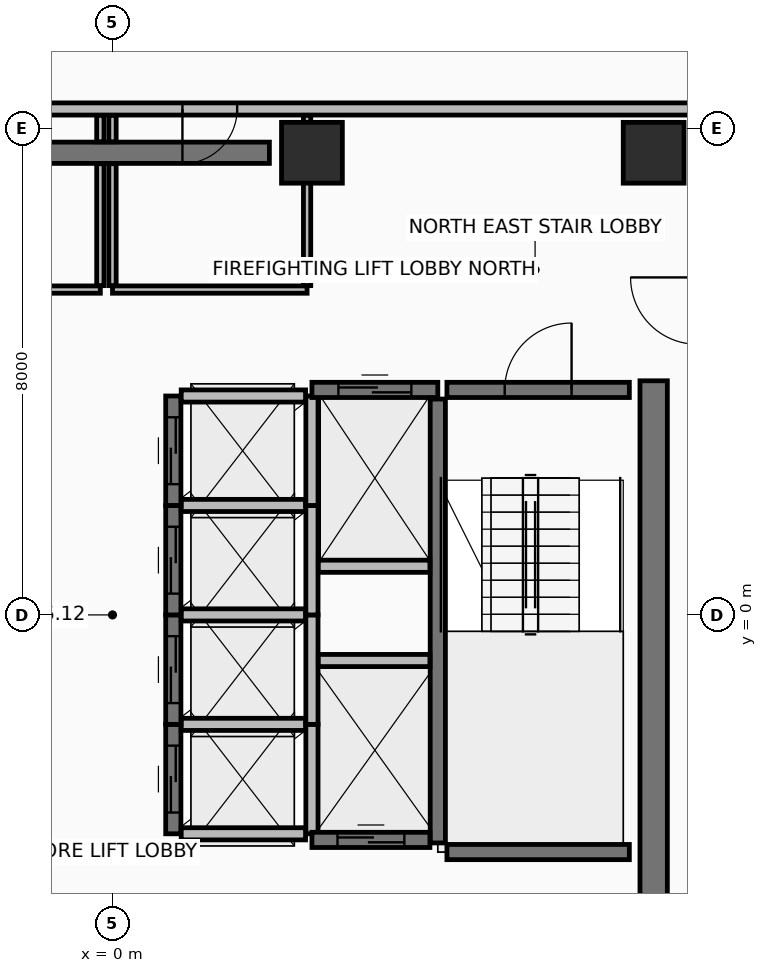
"""IFC4 building model, lengths in metres.
Left out: names, types, materials, properties, quantities, classifications, styles, units other than length and angle.
Written with IfcOpenShell. Run it as: python <this file> out.ifc"""

import sys

from ifc_helpers import new_model, si_unit, direction, frame, frame_2d, origin, origin_2d, place, context, subcontext, project, spatial, rectangle, extrude, element, fill, save


model = new_model("IFC4")
c1 = context("Model", 3, precision=1e-05, world=origin(), true_north=direction((0.0, 1.0)))
c2 = subcontext(c1, "Body", "Model", "MODEL_VIEW")
j1 = project(units=[si_unit("LENGTHUNIT", "METRE"), si_unit("PLANEANGLEUNIT", "RADIAN")], contexts=[c1])
p1 = place(None, origin())
s1 = spatial("IfcSite", under=j1, at=p1, CompositionType="ELEMENT")
p2 = place(p1, origin())
s2 = spatial("IfcBuilding", under=s1, at=p2, CompositionType="ELEMENT")
p3 = place(p2, frame((0.0, 0.0, 234.25)))
s3 = spatial("IfcBuildingStorey", under=s2, at=p3, CompositionType="ELEMENT", Elevation=234.25)
for number, where, z_axis, x_axis in (
    (1, (8.9, 7.6, 0.0), (0.0, 0.0, 1.0), (1.0, 0.0, 0.0)),
    (2, (3.28, 7.6, 0.0), (0.0, 0.0, 1.0), (1.0, 0.0, 0.0)),
):
    element("IfcColumn", number, at=place(p3, frame(where, z_axis=z_axis, x_axis=x_axis)), inside=s3, PredefinedType="COLUMN", context=c2, shape_type="SweptSolid", body=[
        extrude(rectangle(XDim=1.0, YDim=1.0, at=origin_2d()), origin(), (0.0, 0.0, 1.0), 3.6),
    ])
p4 = place(p3, frame((-2.8, 7.6, 0.0), z_axis=(0.0, 0.0, 1.0), x_axis=(1.0, 0.0, 0.0)))
e3 = element("IfcWall", 3, at=p4, inside=s3, PredefinedType="SHEAR", context=c2, shape_type="SweptSolid", body=[
    extrude(rectangle(XDim=5.38, YDim=0.35, at=frame_2d((2.69, 0.0))), origin(), (0.0, 0.0, 1.0), 3.42),
])
p5 = place(p3, frame((8.9, -6.85, 0.0), z_axis=(0.0, 0.0, 1.0), x_axis=(0.0, 1.0, 0.0)))
e4 = element("IfcWall", 4, at=p5, inside=s3, PredefinedType="SHEAR", context=c2, shape_type="SweptSolid", body=[
    extrude(rectangle(XDim=10.7, YDim=0.45, at=frame_2d((5.35, 0.0))), origin(), (0.0, 0.0, 1.0), 3.42),
])
p6 = place(p3, frame((9.62, 8.32, 0.0), z_axis=(0.0, 0.0, 1.0), x_axis=(-1.0, 0.0, 0.0)))
e5 = element("IfcWall", 5, at=p6, inside=s3, PredefinedType="PARTITIONING", context=c2, shape_type="SweptSolid", body=[
    extrude(rectangle(XDim=19.24, YDim=0.2, at=frame_2d((9.62, 0.0))), origin(), (0.0, 0.0, 1.0), 2.915),
])
p7 = place(p6, frame((10.97, 0.0, 0.0)))
e6 = element("IfcOpeningElement", 6, at=p7, cuts=e5, PredefinedType="OPENING", context=c2, shape_type="SweptSolid", body=[
    extrude(rectangle(XDim=0.9, YDim=2.1, at=frame_2d((0.45, 1.05))), frame((0.0, 0.11, 0.0), z_axis=(0.0, -1.0, 0.0), x_axis=(1.0, 0.0, 0.0)), (0.0, 0.0, 1.0), 0.22),
])
p8 = place(p6, frame((7.57, 0.0, 0.0)))
e7 = element("IfcOpeningElement", 7, at=p8, cuts=e5, PredefinedType="OPENING", context=c2, shape_type="SweptSolid", body=[
    extrude(rectangle(XDim=0.9, YDim=2.1, at=frame_2d((0.45, 1.05))), frame((0.0, 0.11, 0.0), z_axis=(0.0, -1.0, 0.0), x_axis=(1.0, 0.0, 0.0)), (0.0, 0.0, 1.0), 0.22),
])
p9 = place(p6, frame((16.245, 0.0, 0.0)))
e8 = element("IfcOpeningElement", 8, at=p9, cuts=e5, PredefinedType="OPENING", context=c2, shape_type="SweptSolid", body=[
    extrude(rectangle(XDim=0.9, YDim=2.1, at=frame_2d((0.45, 1.05))), frame((0.0, 0.11, 0.0), z_axis=(0.0, -1.0, 0.0), x_axis=(1.0, 0.0, 0.0)), (0.0, 0.0, 1.0), 0.22),
])
p10 = place(p6, frame((14.295, 0.0, 0.0)))
e9 = element("IfcOpeningElement", 9, at=p10, cuts=e5, PredefinedType="OPENING", context=c2, shape_type="SweptSolid", body=[
    extrude(rectangle(XDim=0.9, YDim=2.1, at=frame_2d((0.45, 1.05))), frame((0.0, 0.11, 0.0), z_axis=(0.0, -1.0, 0.0), x_axis=(1.0, 0.0, 0.0)), (0.0, 0.0, 1.0), 0.22),
])
p11 = place(p3, frame((5.35, -3.75, 0.0), z_axis=(0.0, 0.0, 1.0), x_axis=(0.0, 1.0, 0.0)))
e10 = element("IfcWall", 10, at=p11, inside=s3, PredefinedType="SHEAR", context=c2, shape_type="SweptSolid", body=[
    extrude(rectangle(XDim=7.3, YDim=0.25, at=frame_2d((3.65, 0.0))), origin(), (0.0, 0.0, 1.0), 3.42),
])
p12 = place(p3, frame((5.5, 3.7, 0.0), z_axis=(0.0, 0.0, 1.0), x_axis=(1.0, 0.0, 0.0)))
e11 = element("IfcWall", 11, at=p12, inside=s3, PredefinedType="SHEAR", context=c2, shape_type="SweptSolid", body=[
    extrude(rectangle(XDim=3.0, YDim=0.25, at=frame_2d((1.5, 0.0))), origin(), (0.0, 0.0, 1.0), 3.42),
])
p13 = place(p12, frame((0.95, 0.0, 0.0)))
e12 = element("IfcOpeningElement", 12, at=p13, cuts=e11, PredefinedType="OPENING", context=c2, shape_type="SweptSolid", body=[
    extrude(rectangle(XDim=1.1, YDim=2.15, at=frame_2d((0.55, 1.075))), frame((0.0, 0.135, 0.0), z_axis=(0.0, -1.0, 0.0), x_axis=(1.0, 0.0, 0.0)), (0.0, 0.0, 1.0), 0.27),
])
p14 = place(p3, frame((5.5, -3.9, 0.0), z_axis=(0.0, 0.0, 1.0), x_axis=(1.0, 0.0, 0.0)))
e13 = element("IfcWall", 13, at=p14, inside=s3, PredefinedType="SHEAR", context=c2, shape_type="SweptSolid", body=[
    extrude(rectangle(XDim=3.0, YDim=0.25, at=frame_2d((1.5, 0.0))), origin(), (0.0, 0.0, 1.0), 3.42),
])
p15 = place(p3, frame((1.0, -3.6, 0.0), z_axis=(0.0, 0.0, 1.0), x_axis=(0.0, 1.0, 0.0)))
e14 = element("IfcWall", 14, at=p15, inside=s3, PredefinedType="SHEAR", context=c2, shape_type="SweptSolid", body=[
    extrude(rectangle(XDim=1.8, YDim=0.25, at=frame_2d((0.9, 0.0))), origin(), (0.0, 0.0, 1.0), 3.42),
])
p16 = place(p15, frame((0.35, 0.0, 0.0)))
e15 = element("IfcOpeningElement", 15, at=p16, cuts=e14, PredefinedType="OPENING", context=c2, shape_type="SweptSolid", body=[
    extrude(rectangle(XDim=1.1, YDim=2.2, at=frame_2d((0.55, 1.1))), frame((0.0, 0.135, 0.0), z_axis=(0.0, -1.0, 0.0), x_axis=(1.0, 0.0, 0.0)), (0.0, 0.0, 1.0), 0.27),
])
p17 = place(p3, frame((3.28, -3.6, 0.0), z_axis=(0.0, 0.0, 1.0), x_axis=(0.0, 1.0, 0.0)))
e16 = element("IfcWall", 16, at=p17, inside=s3, PredefinedType="PARTITIONING", context=c2, shape_type="SweptSolid", body=[
    extrude(rectangle(XDim=1.8, YDim=0.2, at=frame_2d((0.9, 0.0))), origin(), (0.0, 0.0, 1.0), 3.42),
])
for number, where, z_axis, x_axis in (
    (17, (1.13, -3.6, 0.0), (0.0, 0.0, 1.0), (1.0, 0.0, 0.0)),
    (18, (1.13, -1.8, 0.0), (0.0, 0.0, 1.0), (1.0, 0.0, 0.0)),
):
    element("IfcWall", number, at=place(p3, frame(where, z_axis=z_axis, x_axis=x_axis)), inside=s3, PredefinedType="PARTITIONING", context=c2, shape_type="SweptSolid", body=[
        extrude(rectangle(XDim=2.045, YDim=0.2, at=frame_2d((1.022, 0.0))), origin(), (0.0, 0.0, 1.0), 3.42),
    ])
p18 = place(p3, frame((1.0, -1.8, 0.0), z_axis=(0.0, 0.0, 1.0), x_axis=(0.0, 1.0, 0.0)))
e19 = element("IfcWall", 19, at=p18, inside=s3, PredefinedType="SHEAR", context=c2, shape_type="SweptSolid", body=[
    extrude(rectangle(XDim=1.8, YDim=0.25, at=frame_2d((0.9, 0.0))), origin(), (0.0, 0.0, 1.0), 3.42),
])
p19 = place(p18, frame((0.35, 0.0, 0.0)))
e20 = element("IfcOpeningElement", 20, at=p19, cuts=e19, PredefinedType="OPENING", context=c2, shape_type="SweptSolid", body=[
    extrude(rectangle(XDim=1.1, YDim=2.2, at=frame_2d((0.55, 1.1))), frame((0.0, 0.135, 0.0), z_axis=(0.0, -1.0, 0.0), x_axis=(1.0, 0.0, 0.0)), (0.0, 0.0, 1.0), 0.27),
])
p20 = place(p3, frame((3.28, -1.8, 0.0), z_axis=(0.0, 0.0, 1.0), x_axis=(0.0, 1.0, 0.0)))
e21 = element("IfcWall", 21, at=p20, inside=s3, PredefinedType="PARTITIONING", context=c2, shape_type="SweptSolid", body=[
    extrude(rectangle(XDim=1.8, YDim=0.2, at=frame_2d((0.9, 0.0))), origin(), (0.0, 0.0, 1.0), 3.42),
])
p21 = place(p3, frame((1.13, 0.0, 0.0), z_axis=(0.0, 0.0, 1.0), x_axis=(1.0, 0.0, 0.0)))
e22 = element("IfcWall", 22, at=p21, inside=s3, PredefinedType="PARTITIONING", context=c2, shape_type="SweptSolid", body=[
    extrude(rectangle(XDim=2.045, YDim=0.2, at=frame_2d((1.022, 0.0))), origin(), (0.0, 0.0, 1.0), 3.42),
])
p22 = place(p3, frame((1.0, 0.0, 0.0), z_axis=(0.0, 0.0, 1.0), x_axis=(0.0, 1.0, 0.0)))
e23 = element("IfcWall", 23, at=p22, inside=s3, PredefinedType="SHEAR", context=c2, shape_type="SweptSolid", body=[
    extrude(rectangle(XDim=1.8, YDim=0.25, at=frame_2d((0.9, 0.0))), origin(), (0.0, 0.0, 1.0), 3.42),
])
p23 = place(p22, frame((0.35, 0.0, 0.0)))
e24 = element("IfcOpeningElement", 24, at=p23, cuts=e23, PredefinedType="OPENING", context=c2, shape_type="SweptSolid", body=[
    extrude(rectangle(XDim=1.1, YDim=2.2, at=frame_2d((0.55, 1.1))), frame((0.0, 0.135, 0.0), z_axis=(0.0, -1.0, 0.0), x_axis=(1.0, 0.0, 0.0)), (0.0, 0.0, 1.0), 0.27),
])
p24 = place(p3, frame((3.28, 0.0, 0.0), z_axis=(0.0, 0.0, 1.0), x_axis=(0.0, 1.0, 0.0)))
e25 = element("IfcWall", 25, at=p24, inside=s3, PredefinedType="PARTITIONING", context=c2, shape_type="SweptSolid", body=[
    extrude(rectangle(XDim=1.8, YDim=0.2, at=frame_2d((0.9, 0.0))), origin(), (0.0, 0.0, 1.0), 3.42),
])
p25 = place(p3, frame((1.13, 1.8, 0.0), z_axis=(0.0, 0.0, 1.0), x_axis=(1.0, 0.0, 0.0)))
e26 = element("IfcWall", 26, at=p25, inside=s3, PredefinedType="PARTITIONING", context=c2, shape_type="SweptSolid", body=[
    extrude(rectangle(XDim=2.045, YDim=0.2, at=frame_2d((1.022, 0.0))), origin(), (0.0, 0.0, 1.0), 3.42),
])
p26 = place(p3, frame((1.0, 1.8, 0.0), z_axis=(0.0, 0.0, 1.0), x_axis=(0.0, 1.0, 0.0)))
e27 = element("IfcWall", 27, at=p26, inside=s3, PredefinedType="SHEAR", context=c2, shape_type="SweptSolid", body=[
    extrude(rectangle(XDim=1.8, YDim=0.25, at=frame_2d((0.9, 0.0))), origin(), (0.0, 0.0, 1.0), 3.42),
])
p27 = place(p26, frame((0.35, 0.0, 0.0)))
e28 = element("IfcOpeningElement", 28, at=p27, cuts=e27, PredefinedType="OPENING", context=c2, shape_type="SweptSolid", body=[
    extrude(rectangle(XDim=1.1, YDim=2.2, at=frame_2d((0.55, 1.1))), frame((0.0, 0.135, 0.0), z_axis=(0.0, -1.0, 0.0), x_axis=(1.0, 0.0, 0.0)), (0.0, 0.0, 1.0), 0.27),
])
p28 = place(p3, frame((3.28, 1.8, 0.0), z_axis=(0.0, 0.0, 1.0), x_axis=(0.0, 1.0, 0.0)))
e29 = element("IfcWall", 29, at=p28, inside=s3, PredefinedType="PARTITIONING", context=c2, shape_type="SweptSolid", body=[
    extrude(rectangle(XDim=1.8, YDim=0.2, at=frame_2d((0.9, 0.0))), origin(), (0.0, 0.0, 1.0), 3.42),
])
p29 = place(p3, frame((1.13, 3.6, 0.0), z_axis=(0.0, 0.0, 1.0), x_axis=(1.0, 0.0, 0.0)))
e30 = element("IfcWall", 30, at=p29, inside=s3, PredefinedType="PARTITIONING", context=c2, shape_type="SweptSolid", body=[
    extrude(rectangle(XDim=2.045, YDim=0.2, at=frame_2d((1.022, 0.0))), origin(), (0.0, 0.0, 1.0), 2.715),
])
p30 = place(p3, frame((3.28, 3.7, 0.0), z_axis=(0.0, 0.0, 1.0), x_axis=(1.0, 0.0, 0.0)))
e31 = element("IfcWall", 31, at=p30, inside=s3, PredefinedType="SHEAR", context=c2, shape_type="SweptSolid", body=[
    extrude(rectangle(XDim=2.07, YDim=0.25, at=frame_2d((1.035, 0.0))), origin(), (0.0, 0.0, 1.0), 3.42),
])
p31 = place(p30, frame((0.435, 0.0, 0.0)))
e32 = element("IfcOpeningElement", 32, at=p31, cuts=e31, PredefinedType="OPENING", context=c2, shape_type="SweptSolid", body=[
    extrude(rectangle(XDim=1.2, YDim=2.2, at=frame_2d((0.6, 1.1))), frame((0.0, 0.135, 0.0), z_axis=(0.0, -1.0, 0.0), x_axis=(1.0, 0.0, 0.0)), (0.0, 0.0, 1.0), 0.27),
])
p32 = place(p3, frame((3.385, 0.8, 0.0), z_axis=(0.0, 0.0, 1.0), x_axis=(1.0, 0.0, 0.0)))
e33 = element("IfcWall", 33, at=p32, inside=s3, PredefinedType="PARTITIONING", context=c2, shape_type="SweptSolid", body=[
    extrude(rectangle(XDim=1.835, YDim=0.2, at=frame_2d((0.917, 0.0))), origin(), (0.0, 0.0, 1.0), 3.42),
])
p33 = place(p3, frame((3.28, -3.7, 0.0), z_axis=(0.0, 0.0, 1.0), x_axis=(1.0, 0.0, 0.0)))
e34 = element("IfcWall", 34, at=p33, inside=s3, PredefinedType="SHEAR", context=c2, shape_type="SweptSolid", body=[
    extrude(rectangle(XDim=1.94, YDim=0.25, at=frame_2d((0.97, 0.0))), origin(), (0.0, 0.0, 1.0), 3.42),
])
p34 = place(p33, frame((0.42, 0.0, 0.0)))
e35 = element("IfcOpeningElement", 35, at=p34, cuts=e34, PredefinedType="OPENING", context=c2, shape_type="SweptSolid", body=[
    extrude(rectangle(XDim=1.1, YDim=2.2, at=frame_2d((0.55, 1.1))), frame((0.0, 0.135, 0.0), z_axis=(0.0, -1.0, 0.0), x_axis=(1.0, 0.0, 0.0)), (0.0, 0.0, 1.0), 0.27),
])
p35 = place(p3, frame((3.385, -0.75, 0.0), z_axis=(0.0, 0.0, 1.0), x_axis=(1.0, 0.0, 0.0)))
e36 = element("IfcWall", 36, at=p35, inside=s3, PredefinedType="PARTITIONING", context=c2, shape_type="SweptSolid", body=[
    extrude(rectangle(XDim=1.835, YDim=0.2, at=frame_2d((0.917, 0.0))), origin(), (0.0, 0.0, 1.0), 3.42),
])
p36 = place(p3, frame((-3.4, 5.35, 0.0), z_axis=(0.0, 0.0, 1.0), x_axis=(1.0, 0.0, 0.0)))
e37 = element("IfcWall", 37, at=p36, inside=s3, PredefinedType="PARTITIONING", context=c2, shape_type="SweptSolid", body=[
    extrude(rectangle(XDim=3.2, YDim=0.12, at=frame_2d((1.6, 0.0))), origin(), (0.0, 0.0, 1.0), 3.42),
])
p37 = place(p3, frame((-0.2, 5.415, 0.0), z_axis=(0.0, 0.0, 1.0), x_axis=(0.0, 1.0, 0.0)))
e38 = element("IfcWall", 38, at=p37, inside=s3, PredefinedType="PARTITIONING", context=c2, shape_type="SweptSolid", body=[
    extrude(rectangle(XDim=2.005, YDim=0.12, at=frame_2d((1.002, 0.0))), origin(), (0.0, 0.0, 1.0), 2.715),
])
p38 = place(p3, frame((-0.2, 7.78, 0.0), z_axis=(0.0, 0.0, 1.0), x_axis=(0.0, 1.0, 0.0)))
e39 = element("IfcWall", 39, at=p38, inside=s3, PredefinedType="PARTITIONING", context=c2, shape_type="SweptSolid", body=[
    extrude(rectangle(XDim=0.435, YDim=0.12, at=frame_2d((0.218, 0.0))), origin(), (0.0, 0.0, 1.0), 2.715),
])
p39 = place(p3, frame((0.0, 5.35, 0.0), z_axis=(0.0, 0.0, 1.0), x_axis=(1.0, 0.0, 0.0)))
e40 = element("IfcWall", 40, at=p39, inside=s3, PredefinedType="PARTITIONING", context=c2, shape_type="SweptSolid", body=[
    extrude(rectangle(XDim=3.2, YDim=0.12, at=frame_2d((1.6, 0.0))), origin(), (0.0, 0.0, 1.0), 2.715),
])
p40 = place(p3, frame((3.2, 5.415, 0.0), z_axis=(0.0, 0.0, 1.0), x_axis=(0.0, 1.0, 0.0)))
e41 = element("IfcWall", 41, at=p40, inside=s3, PredefinedType="PARTITIONING", context=c2, shape_type="SweptSolid", body=[
    extrude(rectangle(XDim=2.8, YDim=0.12, at=frame_2d((1.4, 0.0))), origin(), (0.0, 0.0, 1.0), 2.715),
])
p41 = place(p3, frame((0.0, 8.215, 0.0), z_axis=(0.0, 0.0, 1.0), x_axis=(0.0, -1.0, 0.0)))
e42 = element("IfcWall", 42, at=p41, inside=s3, PredefinedType="PARTITIONING", context=c2, shape_type="SweptSolid", body=[
    extrude(rectangle(XDim=0.435, YDim=0.12, at=frame_2d((0.218, 0.0))), origin(), (0.0, 0.0, 1.0), 2.715),
])
p42 = place(p3, frame((0.0, 7.42, 0.0), z_axis=(0.0, 0.0, 1.0), x_axis=(0.0, -1.0, 0.0)))
e43 = element("IfcWall", 43, at=p42, inside=s3, PredefinedType="PARTITIONING", context=c2, shape_type="SweptSolid", body=[
    extrude(rectangle(XDim=2.005, YDim=0.12, at=frame_2d((1.002, 0.0))), origin(), (0.0, 0.0, 1.0), 2.715),
])
p43 = place(p13, frame((1.1, 0.0, 0.0), z_axis=(0.0, 0.0, 1.0), x_axis=(-1.0, 0.0, 0.0)))
e44 = element("IfcDoor", 44, at=p43, inside=s3, OperationType="SINGLE_SWING_LEFT", PredefinedType="DOOR", context=c2, shape_type="SweptSolid", body=[
    extrude(rectangle(XDim=1.1, YDim=2.15, at=frame_2d((0.55, 1.075))), frame((0.0, 0.025, 0.0), z_axis=(0.0, -1.0, 0.0), x_axis=(1.0, 0.0, 0.0)), (0.0, 0.0, 1.0), 0.05),
])
fill(e12, e44)
p44 = place(p16, origin())
e45 = element("IfcDoor", 45, at=p44, inside=s3, OperationType="SLIDING_TO_LEFT", PredefinedType="DOOR", context=c2, shape_type="SweptSolid", body=[
    extrude(rectangle(XDim=1.1, YDim=2.2, at=frame_2d((0.55, 1.1))), frame((0.0, 0.025, 0.0), z_axis=(0.0, -1.0, 0.0), x_axis=(1.0, 0.0, 0.0)), (0.0, 0.0, 1.0), 0.05),
])
fill(e15, e45)
p45 = place(p19, origin())
e46 = element("IfcDoor", 46, at=p45, inside=s3, OperationType="SLIDING_TO_LEFT", PredefinedType="DOOR", context=c2, shape_type="SweptSolid", body=[
    extrude(rectangle(XDim=1.1, YDim=2.2, at=frame_2d((0.55, 1.1))), frame((0.0, 0.025, 0.0), z_axis=(0.0, -1.0, 0.0), x_axis=(1.0, 0.0, 0.0)), (0.0, 0.0, 1.0), 0.05),
])
fill(e20, e46)
p46 = place(p23, origin())
e47 = element("IfcDoor", 47, at=p46, inside=s3, OperationType="SLIDING_TO_LEFT", PredefinedType="DOOR", context=c2, shape_type="SweptSolid", body=[
    extrude(rectangle(XDim=1.1, YDim=2.2, at=frame_2d((0.55, 1.1))), frame((0.0, 0.025, 0.0), z_axis=(0.0, -1.0, 0.0), x_axis=(1.0, 0.0, 0.0)), (0.0, 0.0, 1.0), 0.05),
])
fill(e24, e47)
p47 = place(p27, origin())
e48 = element("IfcDoor", 48, at=p47, inside=s3, OperationType="SLIDING_TO_LEFT", PredefinedType="DOOR", context=c2, shape_type="SweptSolid", body=[
    extrude(rectangle(XDim=1.1, YDim=2.2, at=frame_2d((0.55, 1.1))), frame((0.0, 0.025, 0.0), z_axis=(0.0, -1.0, 0.0), x_axis=(1.0, 0.0, 0.0)), (0.0, 0.0, 1.0), 0.05),
])
fill(e28, e48)
p48 = place(p31, origin())
e49 = element("IfcDoor", 49, at=p48, inside=s3, OperationType="SLIDING_TO_RIGHT", PredefinedType="DOOR", context=c2, shape_type="SweptSolid", body=[
    extrude(rectangle(XDim=1.2, YDim=2.2, at=frame_2d((0.6, 1.1))), frame((0.0, 0.025, 0.0), z_axis=(0.0, -1.0, 0.0), x_axis=(1.0, 0.0, 0.0)), (0.0, 0.0, 1.0), 0.05),
])
fill(e32, e49)
p49 = place(p34, origin())
e50 = element("IfcDoor", 50, at=p49, inside=s3, OperationType="SLIDING_TO_LEFT", PredefinedType="DOOR", context=c2, shape_type="SweptSolid", body=[
    extrude(rectangle(XDim=1.1, YDim=2.2, at=frame_2d((0.55, 1.1))), frame((0.0, 0.025, 0.0), z_axis=(0.0, -1.0, 0.0), x_axis=(1.0, 0.0, 0.0)), (0.0, 0.0, 1.0), 0.05),
])
fill(e35, e50)
p50 = place(p8, frame((0.9, 0.0, 0.0), z_axis=(0.0, 0.0, 1.0), x_axis=(-1.0, 0.0, 0.0)))
e51 = element("IfcDoor", 51, at=p50, inside=s3, OperationType="SINGLE_SWING_LEFT", PredefinedType="DOOR", context=c2, shape_type="SweptSolid", body=[
    extrude(rectangle(XDim=0.9, YDim=2.1, at=frame_2d((0.45, 1.05))), frame((0.0, 0.025, 0.0), z_axis=(0.0, -1.0, 0.0), x_axis=(1.0, 0.0, 0.0)), (0.0, 0.0, 1.0), 0.05),
])
fill(e7, e51)
save(model, sys.argv[1])
